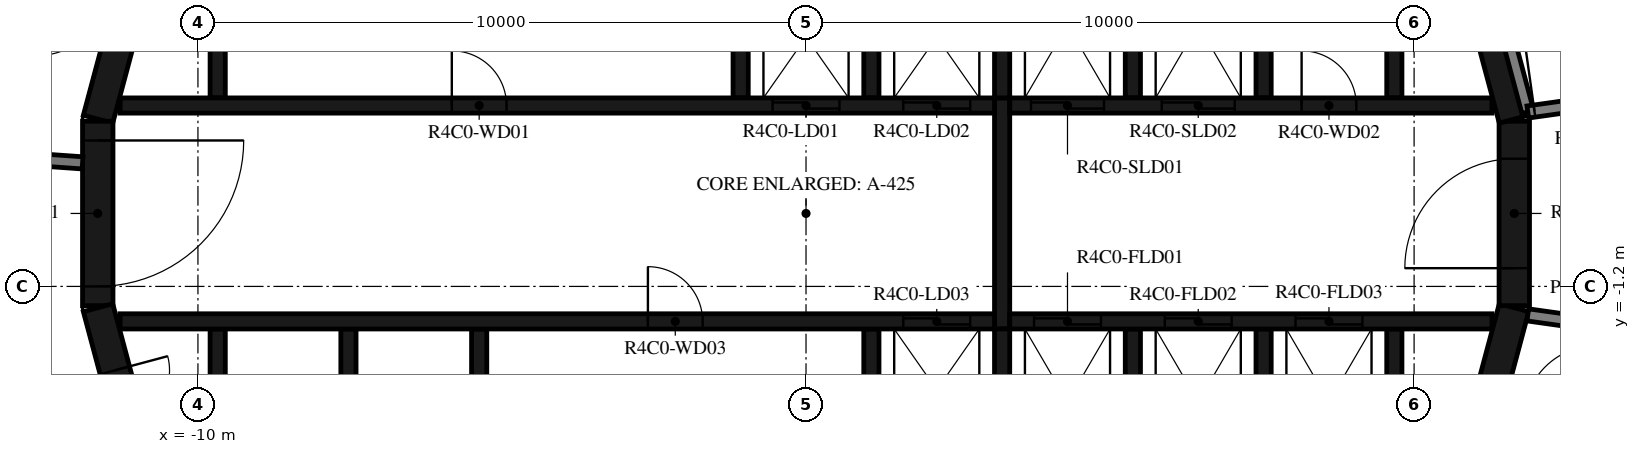
"""IFC4 building model, lengths in metres.
Left out: names, types, materials, properties, quantities, classifications, styles, units other than length and angle.
Written with IfcOpenShell. Run it as: python <this file> out.ifc"""

import sys

from ifc_helpers import new_model, si_unit, direction, frame, frame_2d, origin, place, context, subcontext, project, spatial, polyline, rectangle, outline, extrude, element, fill, save


model = new_model("IFC4")
c1 = context("Model", 3, precision=1e-05, world=origin(), true_north=direction((0.0, 1.0)))
c2 = subcontext(c1, "Body", "Model", "MODEL_VIEW")
j1 = project(units=[si_unit("LENGTHUNIT", "METRE"), si_unit("PLANEANGLEUNIT", "RADIAN")], contexts=[c1])
p1 = place(None, origin())
s1 = spatial("IfcSite", under=j1, at=p1, CompositionType="ELEMENT")
p2 = place(p1, origin())
s2 = spatial("IfcBuilding", under=s1, at=p2, CompositionType="ELEMENT")
p3 = place(p2, frame((0.0, 0.0, 172.7)))
s3 = spatial("IfcBuildingStorey", under=s2, at=p3, CompositionType="ELEMENT", Elevation=172.7)
p4 = place(p3, frame((10.858, -4.479, 0.0), z_axis=(0.0, 0.0, 1.0), x_axis=(0.258734743916, 0.965948410781, 0.0)))
e1 = element("IfcWall", 1, at=p4, inside=s3, PredefinedType="SHEAR", context=c2, shape_type="SweptSolid", body=[
    extrude(rectangle(XDim=3.033, YDim=0.5, at=frame_2d((1.516, 0.0))), origin(), (0.0, 0.0, 1.0), 3.12),
])
p5 = place(p3, frame((11.647, -1.516, 0.0), z_axis=(0.0, 0.0, 1.0), x_axis=(0.0, 1.0, 0.0)))
e2 = element("IfcWall", 2, at=p5, inside=s3, PredefinedType="SHEAR", context=c2, shape_type="SweptSolid", body=[
    extrude(rectangle(XDim=3.033, YDim=0.5, at=frame_2d((1.516, 0.0))), origin(), (0.0, 0.0, 1.0), 3.12),
])
p6 = place(p5, frame((0.616, 0.0, 0.0)))
e3 = element("IfcOpeningElement", 3, at=p6, cuts=e2, PredefinedType="OPENING", context=c2, shape_type="SweptSolid", body=[
    extrude(rectangle(XDim=1.8, YDim=2.1, at=frame_2d((0.9, 1.05))), frame((0.0, 0.26, 0.0), z_axis=(0.0, -1.0, 0.0), x_axis=(1.0, 0.0, 0.0)), (0.0, 0.0, 1.0), 0.52),
])
for number, where, z_axis, x_axis in (
    (4, (11.643, 1.55, 0.0), (0.0, 0.0, 1.0), (-0.259, 0.966, 0.0)),
    (5, (-10.858, 4.479, 0.0), (0.0, 0.0, 1.0), (-0.259, -0.966, 0.0)),
):
    element("IfcWall", number, at=place(p3, frame(where, z_axis=z_axis, x_axis=x_axis)), inside=s3, PredefinedType="SHEAR", context=c2, shape_type="SweptSolid", body=[
        extrude(rectangle(XDim=3.033, YDim=0.5, at=frame_2d((1.516, 0.0))), origin(), (0.0, 0.0, 1.0), 3.12),
    ])
p7 = place(p3, frame((-11.647, 1.516, 0.0), z_axis=(0.0, 0.0, 1.0), x_axis=(0.0, -1.0, 0.0)))
e6 = element("IfcWall", 6, at=p7, inside=s3, PredefinedType="SHEAR", context=c2, shape_type="SweptSolid", body=[
    extrude(rectangle(XDim=3.033, YDim=0.5, at=frame_2d((1.516, 0.0))), origin(), (0.0, 0.0, 1.0), 3.12),
])
p8 = place(p7, frame((0.316, 0.0, 0.0)))
e7 = element("IfcOpeningElement", 7, at=p8, cuts=e6, PredefinedType="OPENING", context=c2, shape_type="SweptSolid", body=[
    extrude(rectangle(XDim=2.4, YDim=2.1, at=frame_2d((1.2, 1.05))), frame((0.0, 0.26, 0.0), z_axis=(0.0, -1.0, 0.0), x_axis=(1.0, 0.0, 0.0)), (0.0, 0.0, 1.0), 0.52),
])
p9 = place(p3, frame((-11.643, -1.55, 0.0), z_axis=(0.0, 0.0, 1.0), x_axis=(0.258734743916, -0.965948410781, 0.0)))
e8 = element("IfcWall", 8, at=p9, inside=s3, PredefinedType="SHEAR", context=c2, shape_type="SweptSolid", body=[
    extrude(rectangle(XDim=3.033, YDim=0.5, at=frame_2d((1.516, 0.0))), origin(), (0.0, 0.0, 1.0), 3.12),
])
p10 = place(p9, frame((1.066, 0.0, 0.0)))
e9 = element("IfcOpeningElement", 9, at=p10, cuts=e8, PredefinedType="OPENING", context=c2, shape_type="SweptSolid", body=[
    extrude(rectangle(XDim=0.9, YDim=2.1, at=frame_2d((0.45, 1.05))), frame((0.0, 0.26, 0.0), z_axis=(0.0, -1.0, 0.0), x_axis=(1.0, 0.0, 0.0)), (0.0, 0.0, 1.0), 0.52),
])
p11 = place(p3, origin())
e10 = element("IfcWall", 10, at=p11, inside=s3, PredefinedType="SHEAR", context=c2, shape_type="SweptSolid", body=[
    extrude(outline(polyline([(-9.55, 4.8), (-1.2, 4.8), (-1.2, 1.9), (-0.95, 1.9), (-0.95, 4.8), (0.95, 4.8), (0.95, 1.9), (1.2, 1.9), (1.2, 4.8), (3.1, 4.8), (3.1, 1.9), (3.35, 1.9), (3.35, 4.8), (5.25, 4.8), (5.25, 1.9), (5.5, 1.9), (5.5, 4.8), (7.4, 4.8), (7.4, 1.9), (7.65, 1.9), (7.65, 4.8), (9.55, 4.8), (9.55, 1.9), (9.8, 1.9), (9.8, 4.8), (9.8, 5.05), (-9.8, 5.05), (-9.8, 4.8), (-9.8, 1.9), (-9.55, 1.9), (-9.55, 4.8)])), origin(), (0.0, 0.0, 1.0), 3.12),
])
p12 = place(p3, origin())
e11 = element("IfcWall", 11, at=p12, inside=s3, PredefinedType="SHEAR", context=c2, shape_type="SweptSolid", body=[
    extrude(outline(polyline([(9.8, -5.05), (9.8, -4.8), (9.8, -1.9), (9.55, -1.9), (9.55, -4.8), (7.65, -4.8), (7.65, -1.9), (7.4, -1.9), (7.4, -4.8), (5.5, -4.8), (5.5, -1.9), (5.25, -1.9), (5.25, -4.8), (3.35, -4.8), (3.35, -1.9), (3.1, -1.9), (3.1, -4.8), (1.2, -4.8), (1.2, -1.9), (0.95, -1.9), (0.95, -4.8), (-5.25, -4.8), (-5.25, -1.9), (-5.5, -1.9), (-5.5, -4.8), (-7.4, -4.8), (-7.4, -1.9), (-7.65, -1.9), (-7.65, -4.8), (-9.55, -4.8), (-9.55, -1.9), (-9.8, -1.9), (-9.8, -4.8), (-9.8, -5.05), (9.8, -5.05)])), origin(), (0.0, 0.0, 1.0), 3.12),
])
p13 = place(p3, frame((-11.28, 1.775, 0.0), z_axis=(0.0, 0.0, 1.0), x_axis=(1.0, 0.0, 0.0)))
e12 = element("IfcWall", 12, at=p13, inside=s3, PredefinedType="SHEAR", context=c2, shape_type="SweptSolid", body=[
    extrude(rectangle(XDim=14.38, YDim=0.25, at=frame_2d((7.19, 0.0))), origin(), (0.0, 0.0, 1.0), 3.12),
])
p14 = place(p13, frame((10.73, 0.0, 0.0)))
e13 = element("IfcOpeningElement", 13, at=p14, cuts=e12, PredefinedType="OPENING", context=c2, shape_type="SweptSolid", body=[
    extrude(rectangle(XDim=1.1, YDim=2.1, at=frame_2d((0.55, 1.05))), frame((0.0, 0.135, 0.0), z_axis=(0.0, -1.0, 0.0), x_axis=(1.0, 0.0, 0.0)), (0.0, 0.0, 1.0), 0.27),
])
p15 = place(p13, frame((12.88, 0.0, 0.0)))
e14 = element("IfcOpeningElement", 14, at=p15, cuts=e12, PredefinedType="OPENING", context=c2, shape_type="SweptSolid", body=[
    extrude(rectangle(XDim=1.1, YDim=2.1, at=frame_2d((0.55, 1.05))), frame((0.0, 0.135, 0.0), z_axis=(0.0, -1.0, 0.0), x_axis=(1.0, 0.0, 0.0)), (0.0, 0.0, 1.0), 0.27),
])
p16 = place(p13, frame((5.455, 0.0, 0.0)))
e15 = element("IfcOpeningElement", 15, at=p16, cuts=e12, PredefinedType="OPENING", context=c2, shape_type="SweptSolid", body=[
    extrude(rectangle(XDim=0.9, YDim=2.1, at=frame_2d((0.45, 1.05))), frame((0.0, 0.135, 0.0), z_axis=(0.0, -1.0, 0.0), x_axis=(1.0, 0.0, 0.0)), (0.0, 0.0, 1.0), 0.27),
])
p17 = place(p3, frame((3.35, 1.775, 0.0), z_axis=(0.0, 0.0, 1.0), x_axis=(1.0, 0.0, 0.0)))
e16 = element("IfcWall", 16, at=p17, inside=s3, PredefinedType="SHEAR", context=c2, shape_type="SweptSolid", body=[
    extrude(rectangle(XDim=7.93, YDim=0.25, at=frame_2d((3.965, 0.0))), origin(), (0.0, 0.0, 1.0), 3.12),
])
p18 = place(p17, frame((0.35, 0.0, 0.0)))
e17 = element("IfcOpeningElement", 17, at=p18, cuts=e16, PredefinedType="OPENING", context=c2, shape_type="SweptSolid", body=[
    extrude(rectangle(XDim=1.2, YDim=2.4, at=frame_2d((0.6, 1.2))), frame((0.0, 0.135, 0.0), z_axis=(0.0, -1.0, 0.0), x_axis=(1.0, 0.0, 0.0)), (0.0, 0.0, 1.0), 0.27),
])
p19 = place(p17, frame((2.5, 0.0, 0.0)))
e18 = element("IfcOpeningElement", 18, at=p19, cuts=e16, PredefinedType="OPENING", context=c2, shape_type="SweptSolid", body=[
    extrude(rectangle(XDim=1.2, YDim=2.4, at=frame_2d((0.6, 1.2))), frame((0.0, 0.135, 0.0), z_axis=(0.0, -1.0, 0.0), x_axis=(1.0, 0.0, 0.0)), (0.0, 0.0, 1.0), 0.27),
])
p20 = place(p17, frame((4.8, 0.0, 0.0)))
e19 = element("IfcOpeningElement", 19, at=p20, cuts=e16, PredefinedType="OPENING", context=c2, shape_type="SweptSolid", body=[
    extrude(rectangle(XDim=0.9, YDim=2.1, at=frame_2d((0.45, 1.05))), frame((0.0, 0.135, 0.0), z_axis=(0.0, -1.0, 0.0), x_axis=(1.0, 0.0, 0.0)), (0.0, 0.0, 1.0), 0.27),
])
p21 = place(p3, frame((-11.28, -1.775, 0.0), z_axis=(0.0, 0.0, 1.0), x_axis=(1.0, 0.0, 0.0)))
e20 = element("IfcWall", 20, at=p21, inside=s3, PredefinedType="SHEAR", context=c2, shape_type="SweptSolid", body=[
    extrude(rectangle(XDim=14.38, YDim=0.25, at=frame_2d((7.19, 0.0))), origin(), (0.0, 0.0, 1.0), 3.12),
])
p22 = place(p21, frame((12.88, 0.0, 0.0)))
e21 = element("IfcOpeningElement", 21, at=p22, cuts=e20, PredefinedType="OPENING", context=c2, shape_type="SweptSolid", body=[
    extrude(rectangle(XDim=1.1, YDim=2.1, at=frame_2d((0.55, 1.05))), frame((0.0, 0.135, 0.0), z_axis=(0.0, -1.0, 0.0), x_axis=(1.0, 0.0, 0.0)), (0.0, 0.0, 1.0), 0.27),
])
p23 = place(p21, frame((8.68, 0.0, 0.0)))
e22 = element("IfcOpeningElement", 22, at=p23, cuts=e20, PredefinedType="OPENING", context=c2, shape_type="SweptSolid", body=[
    extrude(rectangle(XDim=0.9, YDim=2.1, at=frame_2d((0.45, 1.05))), frame((0.0, 0.135, 0.0), z_axis=(0.0, -1.0, 0.0), x_axis=(1.0, 0.0, 0.0)), (0.0, 0.0, 1.0), 0.27),
])
p24 = place(p3, frame((3.35, -1.775, 0.0), z_axis=(0.0, 0.0, 1.0), x_axis=(1.0, 0.0, 0.0)))
e23 = element("IfcWall", 23, at=p24, inside=s3, PredefinedType="SHEAR", context=c2, shape_type="SweptSolid", body=[
    extrude(rectangle(XDim=7.93, YDim=0.25, at=frame_2d((3.965, 0.0))), origin(), (0.0, 0.0, 1.0), 3.12),
])
p25 = place(p24, frame((0.4, 0.0, 0.0)))
e24 = element("IfcOpeningElement", 24, at=p25, cuts=e23, PredefinedType="OPENING", context=c2, shape_type="SweptSolid", body=[
    extrude(rectangle(XDim=1.1, YDim=2.4, at=frame_2d((0.55, 1.2))), frame((0.0, 0.135, 0.0), z_axis=(0.0, -1.0, 0.0), x_axis=(1.0, 0.0, 0.0)), (0.0, 0.0, 1.0), 0.27),
])
p26 = place(p24, frame((2.55, 0.0, 0.0)))
e25 = element("IfcOpeningElement", 25, at=p26, cuts=e23, PredefinedType="OPENING", context=c2, shape_type="SweptSolid", body=[
    extrude(rectangle(XDim=1.1, YDim=2.4, at=frame_2d((0.55, 1.2))), frame((0.0, 0.135, 0.0), z_axis=(0.0, -1.0, 0.0), x_axis=(1.0, 0.0, 0.0)), (0.0, 0.0, 1.0), 0.27),
])
p27 = place(p24, frame((4.7, 0.0, 0.0)))
e26 = element("IfcOpeningElement", 26, at=p27, cuts=e23, PredefinedType="OPENING", context=c2, shape_type="SweptSolid", body=[
    extrude(rectangle(XDim=1.1, YDim=2.4, at=frame_2d((0.55, 1.2))), frame((0.0, 0.135, 0.0), z_axis=(0.0, -1.0, 0.0), x_axis=(1.0, 0.0, 0.0)), (0.0, 0.0, 1.0), 0.27),
])
p28 = place(p3, frame((3.225, -1.9, 0.0), z_axis=(0.0, 0.0, 1.0), x_axis=(0.0, 1.0, 0.0)))
e27 = element("IfcWall", 27, at=p28, inside=s3, PredefinedType="SHEAR", context=c2, shape_type="SweptSolid", body=[
    extrude(rectangle(XDim=3.8, YDim=0.25, at=frame_2d((1.9, 0.0))), origin(), (0.0, 0.0, 1.0), 3.12),
])
p29 = place(p3, frame((11.87, 1.668, 0.0), z_axis=(0.0, 0.0, 1.0), x_axis=(-0.258836880648, 0.965921047093, 0.0)))
e28 = element("IfcWall", 28, at=p29, inside=s3, PredefinedType="STANDARD", context=c2, shape_type="SweptSolid", body=[
    extrude(rectangle(XDim=1.695, YDim=0.2, at=frame_2d((0.848, 0.0))), origin(), (0.0, 0.0, 1.0), 3.12),
])
p30 = place(p3, frame((11.87, 1.668, 0.0), z_axis=(0.0, 0.0, 1.0), x_axis=(0.990270910415, 0.139152879904, 0.0)))
e29 = element("IfcWall", 29, at=p30, inside=s3, PredefinedType="STANDARD", context=c2, shape_type="SweptSolid", body=[
    extrude(rectangle(XDim=1.688, YDim=0.2, at=frame_2d((0.844, 0.0))), origin(), (0.0, 0.0, 1.0), 3.12),
])
p31 = place(p30, frame((0.11, 0.0, 0.0)))
e30 = element("IfcOpeningElement", 30, at=p31, cuts=e29, PredefinedType="OPENING", context=c2, shape_type="SweptSolid", body=[
    extrude(rectangle(XDim=1.2, YDim=2.1, at=frame_2d((0.6, 1.05))), frame((0.0, 0.11, 0.0), z_axis=(0.0, -1.0, 0.0), x_axis=(1.0, 0.0, 0.0)), (0.0, 0.0, 1.0), 0.22),
])
p32 = place(p3, frame((13.542, 1.903, 0.0), z_axis=(0.0, 0.0, 1.0), x_axis=(-0.333808508206, 0.942640907159, 0.0)))
e31 = element("IfcWall", 31, at=p32, inside=s3, PredefinedType="STANDARD", context=c2, shape_type="SweptSolid", body=[
    extrude(rectangle(XDim=6.317, YDim=0.2, at=frame_2d((3.158, 0.0))), origin(), (0.0, 0.0, 1.0), 3.12),
])
p33 = place(p3, frame((-13.454, 0.941, 0.0), z_axis=(0.0, 0.0, 1.0), x_axis=(0.99755155062, -0.069934997354, 0.0)))
e32 = element("IfcWall", 32, at=p33, inside=s3, PredefinedType="STANDARD", context=c2, shape_type="SweptSolid", body=[
    extrude(rectangle(XDim=1.561, YDim=0.2, at=frame_2d((0.78, 0.0))), origin(), (0.0, 0.0, 1.0), 3.12),
])
p34 = place(p3, frame((13.282, -1.867, 0.0), z_axis=(0.0, 0.0, 1.0), x_axis=(-0.990265430288, 0.139191873241, 0.0)))
e33 = element("IfcWall", 33, at=p34, inside=s3, PredefinedType="STANDARD", context=c2, shape_type="SweptSolid", body=[
    extrude(rectangle(XDim=1.426, YDim=0.2, at=frame_2d((0.713, 0.0))), origin(), (0.0, 0.0, 1.0), 3.12),
])
p35 = place(p8, origin())
e34 = element("IfcDoor", 34, at=p35, inside=s3, OperationType="DOUBLE_DOOR_SINGLE_SWING", PredefinedType="DOOR", context=c2, shape_type="SweptSolid", body=[
    extrude(rectangle(XDim=2.4, YDim=2.1, at=frame_2d((1.2, 1.05))), frame((0.0, 0.025, 0.0), z_axis=(0.0, -1.0, 0.0), x_axis=(1.0, 0.0, 0.0)), (0.0, 0.0, 1.0), 0.05),
])
fill(e7, e34)
p36 = place(p6, origin())
e35 = element("IfcDoor", 35, at=p36, inside=s3, OperationType="DOUBLE_DOOR_SINGLE_SWING", PredefinedType="DOOR", context=c2, shape_type="SweptSolid", body=[
    extrude(rectangle(XDim=1.8, YDim=2.1, at=frame_2d((0.9, 1.05))), frame((0.0, 0.025, 0.0), z_axis=(0.0, -1.0, 0.0), x_axis=(1.0, 0.0, 0.0)), (0.0, 0.0, 1.0), 0.05),
])
fill(e3, e35)
p37 = place(p14, origin())
e36 = element("IfcDoor", 36, at=p37, inside=s3, OperationType="DOUBLE_DOOR_SLIDING", PredefinedType="DOOR", context=c2, shape_type="SweptSolid", body=[
    extrude(rectangle(XDim=1.1, YDim=2.1, at=frame_2d((0.55, 1.05))), frame((0.0, 0.025, 0.0), z_axis=(0.0, -1.0, 0.0), x_axis=(1.0, 0.0, 0.0)), (0.0, 0.0, 1.0), 0.05),
])
fill(e13, e36)
p38 = place(p15, origin())
e37 = element("IfcDoor", 37, at=p38, inside=s3, OperationType="DOUBLE_DOOR_SLIDING", PredefinedType="DOOR", context=c2, shape_type="SweptSolid", body=[
    extrude(rectangle(XDim=1.1, YDim=2.1, at=frame_2d((0.55, 1.05))), frame((0.0, 0.025, 0.0), z_axis=(0.0, -1.0, 0.0), x_axis=(1.0, 0.0, 0.0)), (0.0, 0.0, 1.0), 0.05),
])
fill(e14, e37)
p39 = place(p18, origin())
e38 = element("IfcDoor", 38, at=p39, inside=s3, OperationType="DOUBLE_DOOR_SLIDING", PredefinedType="DOOR", context=c2, shape_type="SweptSolid", body=[
    extrude(rectangle(XDim=1.2, YDim=2.4, at=frame_2d((0.6, 1.2))), frame((0.0, 0.025, 0.0), z_axis=(0.0, -1.0, 0.0), x_axis=(1.0, 0.0, 0.0)), (0.0, 0.0, 1.0), 0.05),
])
fill(e17, e38)
p40 = place(p19, origin())
e39 = element("IfcDoor", 39, at=p40, inside=s3, OperationType="DOUBLE_DOOR_SLIDING", PredefinedType="DOOR", context=c2, shape_type="SweptSolid", body=[
    extrude(rectangle(XDim=1.2, YDim=2.4, at=frame_2d((0.6, 1.2))), frame((0.0, 0.025, 0.0), z_axis=(0.0, -1.0, 0.0), x_axis=(1.0, 0.0, 0.0)), (0.0, 0.0, 1.0), 0.05),
])
fill(e18, e39)
p41 = place(p22, origin())
e40 = element("IfcDoor", 40, at=p41, inside=s3, OperationType="DOUBLE_DOOR_SLIDING", PredefinedType="DOOR", context=c2, shape_type="SweptSolid", body=[
    extrude(rectangle(XDim=1.1, YDim=2.1, at=frame_2d((0.55, 1.05))), frame((0.0, 0.025, 0.0), z_axis=(0.0, -1.0, 0.0), x_axis=(1.0, 0.0, 0.0)), (0.0, 0.0, 1.0), 0.05),
])
fill(e21, e40)
p42 = place(p25, origin())
e41 = element("IfcDoor", 41, at=p42, inside=s3, OperationType="DOUBLE_DOOR_SLIDING", PredefinedType="DOOR", context=c2, shape_type="SweptSolid", body=[
    extrude(rectangle(XDim=1.1, YDim=2.4, at=frame_2d((0.55, 1.2))), frame((0.0, 0.025, 0.0), z_axis=(0.0, -1.0, 0.0), x_axis=(1.0, 0.0, 0.0)), (0.0, 0.0, 1.0), 0.05),
])
fill(e24, e41)
p43 = place(p26, origin())
e42 = element("IfcDoor", 42, at=p43, inside=s3, OperationType="DOUBLE_DOOR_SLIDING", PredefinedType="DOOR", context=c2, shape_type="SweptSolid", body=[
    extrude(rectangle(XDim=1.1, YDim=2.4, at=frame_2d((0.55, 1.2))), frame((0.0, 0.025, 0.0), z_axis=(0.0, -1.0, 0.0), x_axis=(1.0, 0.0, 0.0)), (0.0, 0.0, 1.0), 0.05),
])
fill(e25, e42)
p44 = place(p27, origin())
e43 = element("IfcDoor", 43, at=p44, inside=s3, OperationType="DOUBLE_DOOR_SLIDING", PredefinedType="DOOR", context=c2, shape_type="SweptSolid", body=[
    extrude(rectangle(XDim=1.1, YDim=2.4, at=frame_2d((0.55, 1.2))), frame((0.0, 0.025, 0.0), z_axis=(0.0, -1.0, 0.0), x_axis=(1.0, 0.0, 0.0)), (0.0, 0.0, 1.0), 0.05),
])
fill(e26, e43)
p45 = place(p16, origin())
e44 = element("IfcDoor", 44, at=p45, inside=s3, OperationType="SINGLE_SWING_LEFT", PredefinedType="DOOR", context=c2, shape_type="SweptSolid", body=[
    extrude(rectangle(XDim=0.9, YDim=2.1, at=frame_2d((0.45, 1.05))), frame((0.0, 0.025, 0.0), z_axis=(0.0, -1.0, 0.0), x_axis=(1.0, 0.0, 0.0)), (0.0, 0.0, 1.0), 0.05),
])
fill(e15, e44)
p46 = place(p20, origin())
e45 = element("IfcDoor", 45, at=p46, inside=s3, OperationType="SINGLE_SWING_RIGHT", PredefinedType="DOOR", context=c2, shape_type="SweptSolid", body=[
    extrude(rectangle(XDim=0.9, YDim=2.1, at=frame_2d((0.45, 1.05))), frame((0.0, 0.025, 0.0), z_axis=(0.0, -1.0, 0.0), x_axis=(1.0, 0.0, 0.0)), (0.0, 0.0, 1.0), 0.05),
])
fill(e19, e45)
p47 = place(p23, origin())
e46 = element("IfcDoor", 46, at=p47, inside=s3, OperationType="SINGLE_SWING_LEFT", PredefinedType="DOOR", context=c2, shape_type="SweptSolid", body=[
    extrude(rectangle(XDim=0.9, YDim=2.1, at=frame_2d((0.45, 1.05))), frame((0.0, 0.025, 0.0), z_axis=(0.0, -1.0, 0.0), x_axis=(1.0, 0.0, 0.0)), (0.0, 0.0, 1.0), 0.05),
])
fill(e22, e46)
p48 = place(p10, origin())
e47 = element("IfcDoor", 47, at=p48, inside=s3, OperationType="SINGLE_SWING_RIGHT", PredefinedType="DOOR", context=c2, shape_type="SweptSolid", body=[
    extrude(rectangle(XDim=0.9, YDim=2.1, at=frame_2d((0.45, 1.05))), frame((0.0, 0.025, 0.0), z_axis=(0.0, -1.0, 0.0), x_axis=(1.0, 0.0, 0.0)), (0.0, 0.0, 1.0), 0.05),
])
fill(e9, e47)
p49 = place(p31, origin())
e48 = element("IfcDoor", 48, at=p49, inside=s3, OperationType="DOUBLE_DOOR_SINGLE_SWING", PredefinedType="DOOR", context=c2, shape_type="SweptSolid", body=[
    extrude(rectangle(XDim=1.2, YDim=2.1, at=frame_2d((0.6, 1.05))), frame((0.0, 0.025, 0.0), z_axis=(0.0, -1.0, 0.0), x_axis=(1.0, 0.0, 0.0)), (0.0, 0.0, 1.0), 0.05),
])
fill(e30, e48)
save(model, sys.argv[1])
